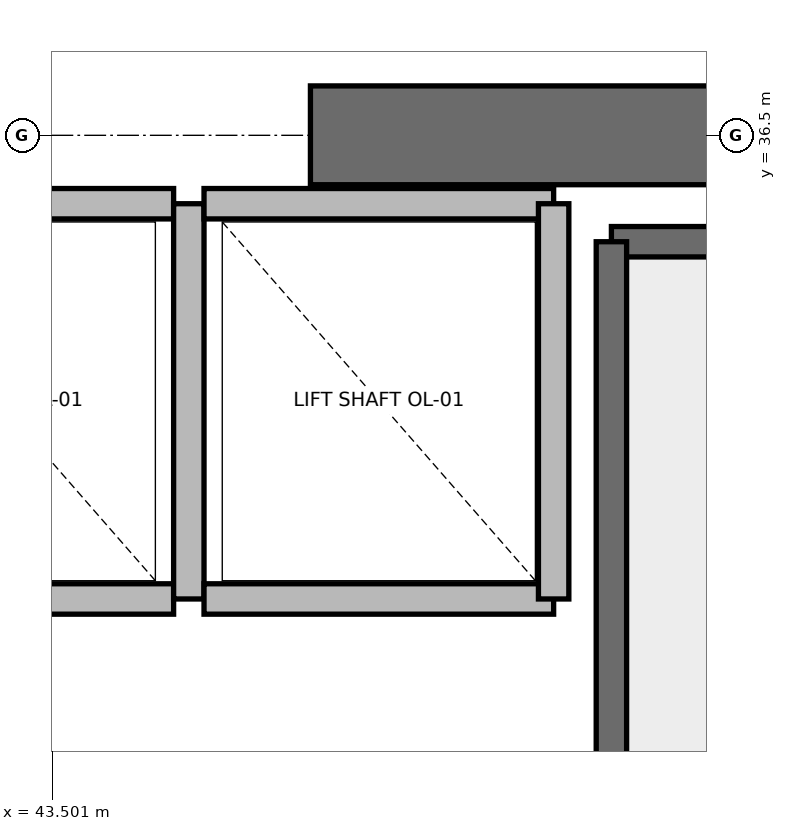
"""IFC4 building model, lengths in metres.
Left out: names, types, materials, properties, quantities, classifications, styles, units other than length and angle.
Written with IfcOpenShell. Run it as: python <this file> out.ifc"""

import sys

from ifc_helpers import new_model, si_unit, direction, frame, frame_2d, origin, place, context, subcontext, project, spatial, rectangle, extrude, element, save


model = new_model("IFC4")
c1 = context("Model", 3, precision=1e-05, world=origin(), true_north=direction((0.0, 1.0)))
c2 = subcontext(c1, "Body", "Model", "MODEL_VIEW")
j1 = project(units=[si_unit("LENGTHUNIT", "METRE"), si_unit("PLANEANGLEUNIT", "RADIAN")], contexts=[c1])
p1 = place(None, origin())
s1 = spatial("IfcSite", under=j1, at=p1, CompositionType="ELEMENT")
p2 = place(p1, origin())
s2 = spatial("IfcBuilding", under=s1, at=p2, CompositionType="ELEMENT")
p3 = place(p2, frame((0.0, 0.0, 95.6)))
s3 = spatial("IfcBuildingStorey", under=s2, at=p3, CompositionType="ELEMENT", Elevation=95.6)
p4 = place(p3, frame((45.2, 36.5, 0.0), z_axis=(0.0, 0.0, 1.0), x_axis=(1.0, 0.0, 0.0)))
e1 = element("IfcWall", 1, at=p4, inside=s3, PredefinedType="SHEAR", context=c2, shape_type="SweptSolid", body=[
    extrude(rectangle(XDim=5.8, YDim=0.65, at=frame_2d((2.9, 0.0))), origin(), (0.0, 0.0, 1.0), 3.76),
])
p5 = place(p3, frame((47.18, 35.8, 0.0), z_axis=(0.0, 0.0, 1.0), x_axis=(1.0, 0.0, 0.0)))
e2 = element("IfcWall", 2, at=p5, inside=s3, PredefinedType="SOLIDWALL", context=c2, shape_type="SweptSolid", body=[
    extrude(rectangle(XDim=3.12, YDim=0.2, at=frame_2d((1.56, 0.0))), origin(), (0.0, 0.0, 1.0), 3.76),
])
p6 = place(p3, frame((47.18, 27.62, 0.0), z_axis=(0.0, 0.0, 1.0), x_axis=(0.0, 1.0, 0.0)))
e3 = element("IfcWall", 3, at=p6, inside=s3, PredefinedType="SOLIDWALL", context=c2, shape_type="SweptSolid", body=[
    extrude(rectangle(XDim=8.18, YDim=0.2, at=frame_2d((4.09, 0.0))), origin(), (0.0, 0.0, 1.0), 3.76),
])
p7 = place(p3, frame((42.0, 33.45, 0.0), z_axis=(0.0, 0.0, 1.0), x_axis=(1.0, 0.0, 0.0)))
e4 = element("IfcWall", 4, at=p7, inside=s3, PredefinedType="SOLIDWALL", context=c2, shape_type="SweptSolid", body=[
    extrude(rectangle(XDim=2.3, YDim=0.2, at=frame_2d((1.15, 0.0))), origin(), (0.0, 0.0, 1.0), 3.76),
])
p8 = place(p3, frame((44.3, 36.05, 0.0), z_axis=(0.0, 0.0, 1.0), x_axis=(-1.0, 0.0, 0.0)))
e5 = element("IfcWall", 5, at=p8, inside=s3, PredefinedType="SOLIDWALL", context=c2, shape_type="SweptSolid", body=[
    extrude(rectangle(XDim=2.3, YDim=0.2, at=frame_2d((1.15, 0.0))), origin(), (0.0, 0.0, 1.0), 2.54),
])
p9 = place(p3, frame((44.4, 33.45, 0.0), z_axis=(0.0, 0.0, 1.0), x_axis=(0.0, 1.0, 0.0)))
e6 = element("IfcWall", 6, at=p9, inside=s3, PredefinedType="SOLIDWALL", context=c2, shape_type="SweptSolid", body=[
    extrude(rectangle(XDim=2.6, YDim=0.2, at=frame_2d((1.3, 0.0))), origin(), (0.0, 0.0, 1.0), 2.54),
])
p10 = place(p3, frame((44.5, 33.45, 0.0), z_axis=(0.0, 0.0, 1.0), x_axis=(1.0, 0.0, 0.0)))
e7 = element("IfcWall", 7, at=p10, inside=s3, PredefinedType="SOLIDWALL", context=c2, shape_type="SweptSolid", body=[
    extrude(rectangle(XDim=2.3, YDim=0.2, at=frame_2d((1.15, 0.0))), origin(), (0.0, 0.0, 1.0), 3.76),
])
p11 = place(p3, frame((46.8, 36.05, 0.0), z_axis=(0.0, 0.0, 1.0), x_axis=(-1.0, 0.0, 0.0)))
e8 = element("IfcWall", 8, at=p11, inside=s3, PredefinedType="SOLIDWALL", context=c2, shape_type="SweptSolid", body=[
    extrude(rectangle(XDim=2.3, YDim=0.2, at=frame_2d((1.15, 0.0))), origin(), (0.0, 0.0, 1.0), 2.54),
])
p12 = place(p3, frame((46.8, 33.45, 0.0), z_axis=(0.0, 0.0, 1.0), x_axis=(0.0, 1.0, 0.0)))
e9 = element("IfcWall", 9, at=p12, inside=s3, PredefinedType="SOLIDWALL", context=c2, shape_type="SweptSolid", body=[
    extrude(rectangle(XDim=2.6, YDim=0.2, at=frame_2d((1.3, 0.0))), origin(), (0.0, 0.0, 1.0), 3.76),
])
save(model, sys.argv[1])
